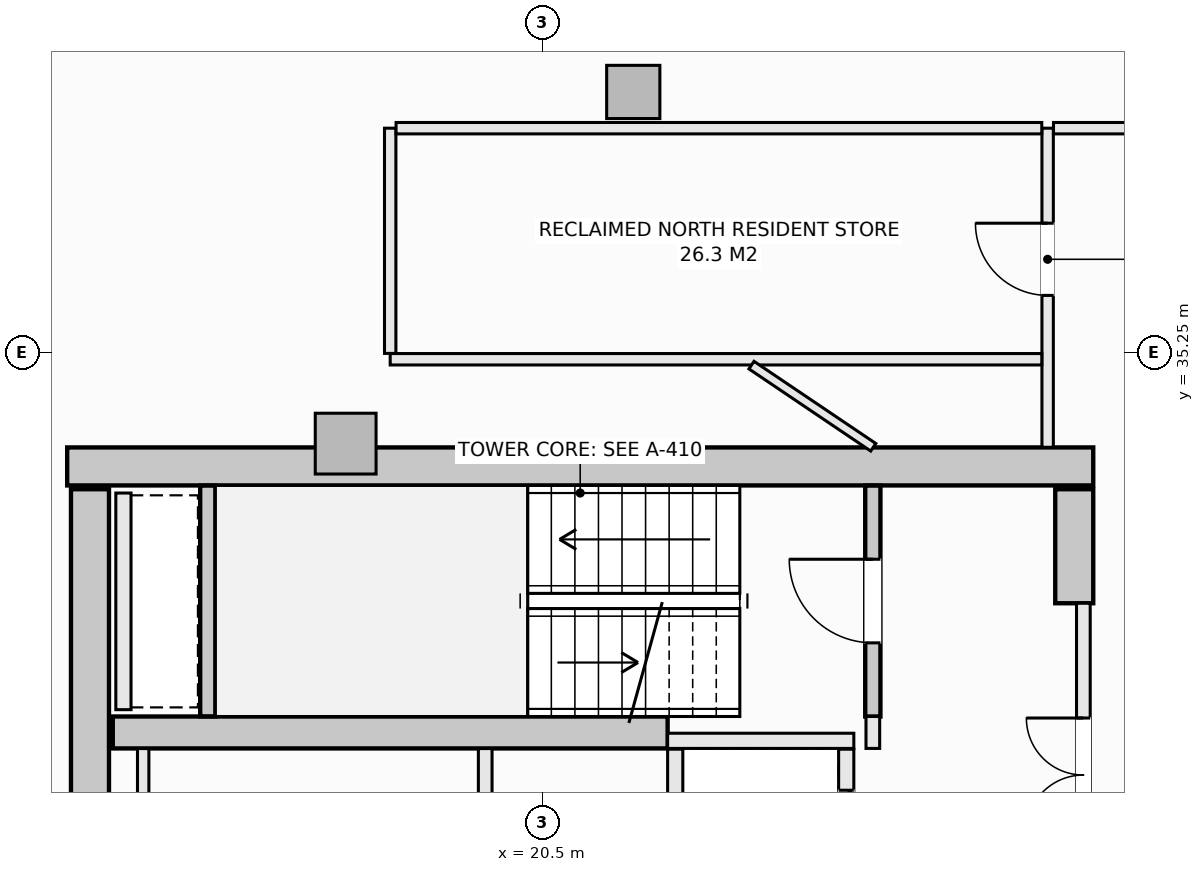
"""IFC4 building model, lengths in metres.
Left out: names, types, materials, properties, quantities, classifications, styles, units other than length and angle.
Written with IfcOpenShell. Run it as: python <this file> out.ifc"""

import sys

from ifc_helpers import new_model, si_unit, direction, frame, frame_2d, origin, origin_2d, place, context, subcontext, project, spatial, rectangle, extrude, element, fill, save


model = new_model("IFC4")
c1 = context("Model", 3, precision=1e-05, world=origin(), true_north=direction((0.0, 1.0)))
c2 = subcontext(c1, "Body", "Model", "MODEL_VIEW")
j1 = project(units=[si_unit("LENGTHUNIT", "METRE"), si_unit("PLANEANGLEUNIT", "RADIAN")], contexts=[c1])
p1 = place(None, origin())
s1 = spatial("IfcSite", under=j1, at=p1, CompositionType="ELEMENT")
p2 = place(p1, origin())
s2 = spatial("IfcBuilding", under=s1, at=p2, CompositionType="ELEMENT")
p3 = place(p2, frame((0.0, 0.0, 199.7)))
s3 = spatial("IfcBuildingStorey", under=s2, at=p3, CompositionType="ELEMENT", Elevation=199.7)
p4 = place(p3, frame((14.25, 33.75, -0.27), z_axis=(0.0, 0.0, 1.0), x_axis=(1.0, 0.0, 0.0)))
e1 = element("IfcWall", 1, at=p4, inside=s3, PredefinedType="SHEAR", context=c2, shape_type="SweptSolid", body=[
    extrude(rectangle(XDim=13.5, YDim=0.5, at=frame_2d((6.75, 0.0))), origin(), (0.0, 0.0, 1.0), 3.3),
])
p5 = place(p3, frame((14.55, 20.55, -0.27), z_axis=(0.0, 0.0, 1.0), x_axis=(0.0, 1.0, 0.0)))
e2 = element("IfcWall", 2, at=p5, inside=s3, PredefinedType="SHEAR", context=c2, shape_type="SweptSolid", body=[
    extrude(rectangle(XDim=12.9, YDim=0.5, at=frame_2d((6.45, 0.0))), origin(), (0.0, 0.0, 1.0), 3.3),
])
p6 = place(p3, frame((27.5, 31.95, -0.27), z_axis=(0.0, 0.0, 1.0), x_axis=(0.0, 1.0, 0.0)))
e3 = element("IfcWall", 3, at=p6, inside=s3, PredefinedType="SHEAR", context=c2, shape_type="SweptSolid", body=[
    extrude(rectangle(XDim=1.5, YDim=0.5, at=frame_2d((0.75, 0.0))), origin(), (0.0, 0.0, 1.0), 3.3),
])
p7 = place(p3, frame((14.85, 30.25, -0.27), z_axis=(0.0, 0.0, 1.0), x_axis=(1.0, 0.0, 0.0)))
e4 = element("IfcWall", 4, at=p7, inside=s3, PredefinedType="SHEAR", context=c2, shape_type="SweptSolid", body=[
    extrude(rectangle(XDim=7.3, YDim=0.42, at=frame_2d((3.65, 0.0))), origin(), (0.0, 0.0, 1.0), 3.3),
])
p8 = place(p3, frame((21.698, 38.677, -0.27), z_axis=(0.0, 0.0, 1.0), x_axis=(1.0, 0.0, 0.0)))
e5 = element("IfcColumn", 5, at=p8, inside=s3, PredefinedType="COLUMN", context=c2, shape_type="SweptSolid", body=[
    extrude(rectangle(XDim=0.7, YDim=0.7, at=origin_2d()), origin(), (0.0, 0.0, 1.0), 3.3),
])
p9 = place(p3, frame((17.914, 34.05, -0.27), z_axis=(0.0, 0.0, 1.0), x_axis=(1.0, 0.0, 0.0)))
e6 = element("IfcColumn", 6, at=p9, inside=s3, PredefinedType="PILASTER", context=c2, shape_type="SweptSolid", body=[
    extrude(rectangle(XDim=0.8, YDim=0.8, at=origin_2d()), origin(), (0.0, 0.0, 1.0), 3.3),
])
p10 = place(p3, frame((8.691, 36.9, 0.0), z_axis=(0.0, 0.0, 1.0), x_axis=(0.901348331142, 0.433094892545, 0.0)))
e7 = element("IfcWall", 7, at=p10, inside=s3, PredefinedType="SOLIDWALL", context=c2, shape_type="SweptSolid", body=[
    extrude(rectangle(XDim=6.021, YDim=0.3, at=frame_2d((3.01, 0.0))), origin(), (0.0, 0.0, 1.0), 2.605),
])
p11 = place(p10, frame((1.91, 0.0, 0.72)))
e8 = element("IfcOpeningElement", 8, at=p11, cuts=e7, PredefinedType="OPENING", context=c2, shape_type="SweptSolid", body=[
    extrude(rectangle(XDim=2.2, YDim=1.65, at=frame_2d((1.1, 0.825))), frame((0.0, 0.16, 0.0), z_axis=(0.0, -1.0, 0.0), x_axis=(1.0, 0.0, 0.0)), (0.0, 0.0, 1.0), 0.32),
])
p12 = place(p3, frame((24.85, 30.46, -0.27), z_axis=(0.0, 0.0, 1.0), x_axis=(0.0, 1.0, 0.0)))
e9 = element("IfcWall", 9, at=p12, inside=s3, PredefinedType="SHEAR", context=c2, shape_type="SweptSolid", body=[
    extrude(rectangle(XDim=3.038, YDim=0.2, at=frame_2d((1.519, 0.0))), origin(), (0.0, 0.0, 1.0), 3.3),
])
p13 = place(p12, frame((0.969, 0.0, 0.27)))
e10 = element("IfcOpeningElement", 10, at=p13, cuts=e9, PredefinedType="OPENING", context=c2, shape_type="SweptSolid", body=[
    extrude(rectangle(XDim=1.1, YDim=2.15, at=frame_2d((0.55, 1.075))), frame((0.0, 0.11, 0.0), z_axis=(0.0, -1.0, 0.0), x_axis=(1.0, 0.0, 0.0)), (0.0, 0.0, 1.0), 0.22),
])
p14 = place(p3, frame((16.1, 30.462, -0.27), z_axis=(0.0, 0.0, 1.0), x_axis=(0.0, 1.0, 0.0)))
e11 = element("IfcWall", 11, at=p14, inside=s3, PredefinedType="SHEAR", context=c2, shape_type="SweptSolid", body=[
    extrude(rectangle(XDim=3.036, YDim=0.2, at=frame_2d((1.518, 0.0))), origin(), (0.0, 0.0, 1.0), 3.3),
])
p15 = place(p3, frame((22.15, 30.14, 0.0), z_axis=(0.0, 0.0, 1.0), x_axis=(1.0, 0.0, 0.0)))
e12 = element("IfcWall", 12, at=p15, inside=s3, PredefinedType="SOLIDWALL", context=c2, shape_type="SweptSolid", body=[
    extrude(rectangle(XDim=2.45, YDim=0.2, at=frame_2d((1.225, 0.0))), origin(), (0.0, 0.0, 1.0), 3.03),
])
p16 = place(p3, frame((22.25, 27.85, 0.0), z_axis=(0.0, 0.0, 1.0), x_axis=(0.0, 1.0, 0.0)))
e13 = element("IfcWall", 13, at=p16, inside=s3, PredefinedType="SOLIDWALL", context=c2, shape_type="SweptSolid", body=[
    extrude(rectangle(XDim=2.18, YDim=0.2, at=frame_2d((1.09, 0.0))), origin(), (0.0, 0.0, 1.0), 3.03),
])
p17 = place(p3, frame((24.5, 27.85, 0.0), z_axis=(0.0, 0.0, 1.0), x_axis=(0.0, 1.0, 0.0)))
e14 = element("IfcWall", 14, at=p17, inside=s3, PredefinedType="SOLIDWALL", context=c2, shape_type="SweptSolid", body=[
    extrude(rectangle(XDim=2.18, YDim=0.2, at=frame_2d((1.09, 0.0))), origin(), (0.0, 0.0, 1.0), 3.03),
])
p18 = place(p17, frame((0.54, 0.0, 0.0)))
e15 = element("IfcOpeningElement", 15, at=p18, cuts=e14, PredefinedType="OPENING", context=c2, shape_type="SweptSolid", body=[
    extrude(rectangle(XDim=1.1, YDim=2.2, at=frame_2d((0.55, 1.1))), frame((0.0, 0.11, 0.0), z_axis=(0.0, -1.0, 0.0), x_axis=(1.0, 0.0, 0.0)), (0.0, 0.0, 1.0), 0.22),
])
p19 = place(p3, frame((14.99, 30.55, 0.0), z_axis=(0.0, 0.0, 1.0), x_axis=(0.0, 1.0, 0.0)))
e16 = element("IfcWall", 16, at=p19, inside=s3, PredefinedType="SOLIDWALL", context=c2, shape_type="SweptSolid", body=[
    extrude(rectangle(XDim=2.85, YDim=0.2, at=frame_2d((1.425, 0.0))), origin(), (0.0, 0.0, 1.0), 3.03),
])
p20 = place(p3, frame((24.85, 30.04, 0.0), z_axis=(0.0, 0.0, 1.0), x_axis=(0.0, 1.0, 0.0)))
e17 = element("IfcWall", 17, at=p20, inside=s3, PredefinedType="SOLIDWALL", context=c2, shape_type="SweptSolid", body=[
    extrude(rectangle(XDim=0.42, YDim=0.18, at=frame_2d((0.21, 0.0))), origin(), (0.0, 0.0, 1.0), 3.03),
])
p21 = place(p3, frame((27.62, 22.05, 0.0), z_axis=(0.0, 0.0, 1.0), x_axis=(0.0, 1.0, 0.0)))
e18 = element("IfcWall", 18, at=p21, inside=s3, PredefinedType="SOLIDWALL", context=c2, shape_type="SweptSolid", body=[
    extrude(rectangle(XDim=9.9, YDim=0.18, at=frame_2d((4.95, 0.0))), origin(), (0.0, 0.0, 1.0), 3.03),
])
p22 = place(p21, frame((4.475, 0.0, 0.0)))
e19 = element("IfcOpeningElement", 19, at=p22, cuts=e18, PredefinedType="OPENING", context=c2, shape_type="SweptSolid", body=[
    extrude(rectangle(XDim=0.95, YDim=2.1, at=frame_2d((0.475, 1.05))), frame((0.0, 0.1, 0.0), z_axis=(0.0, -1.0, 0.0), x_axis=(1.0, 0.0, 0.0)), (0.0, 0.0, 1.0), 0.2),
])
p23 = place(p21, frame((6.89, 0.0, 0.0)))
e20 = element("IfcOpeningElement", 20, at=p23, cuts=e18, PredefinedType="OPENING", context=c2, shape_type="SweptSolid", body=[
    extrude(rectangle(XDim=1.5, YDim=2.2, at=frame_2d((0.75, 1.1))), frame((0.0, 0.1, 0.0), z_axis=(0.0, -1.0, 0.0), x_axis=(1.0, 0.0, 0.0)), (0.0, 0.0, 1.0), 0.2),
])
p24 = place(p21, frame((1.51, 0.0, 0.0)))
e21 = element("IfcOpeningElement", 21, at=p24, cuts=e18, PredefinedType="OPENING", context=c2, shape_type="SweptSolid", body=[
    extrude(rectangle(XDim=1.5, YDim=2.2, at=frame_2d((0.75, 1.1))), frame((0.0, 0.1, 0.0), z_axis=(0.0, -1.0, 0.0), x_axis=(1.0, 0.0, 0.0)), (0.0, 0.0, 1.0), 0.2),
])
p25 = place(p3, frame((15.25, 27.932, 0.0), z_axis=(0.0, 0.0, 1.0), x_axis=(0.0, 1.0, 0.0)))
e22 = element("IfcWall", 22, at=p25, inside=s3, PredefinedType="PARTITIONING", context=c2, shape_type="SweptSolid", body=[
    extrude(rectangle(XDim=2.106, YDim=0.15, at=frame_2d((1.053, 0.0))), origin(), (0.0, 0.0, 1.0), 3.03),
])
p26 = place(p3, frame((19.75, 27.932, 0.0), z_axis=(0.0, 0.0, 1.0), x_axis=(0.0, 1.0, 0.0)))
e23 = element("IfcWall", 23, at=p26, inside=s3, PredefinedType="SOLIDWALL", context=c2, shape_type="SweptSolid", body=[
    extrude(rectangle(XDim=2.106, YDim=0.18, at=frame_2d((1.053, 0.0))), origin(), (0.0, 0.0, 1.0), 3.03),
])
p27 = place(p3, frame((27.15, 34.002, 0.0), z_axis=(0.0, 0.0, 1.0), x_axis=(0.0, 1.0, 0.0)))
e24 = element("IfcWall", 24, at=p27, inside=s3, PredefinedType="PARTITIONING", context=c2, shape_type="SweptSolid", body=[
    extrude(rectangle(XDim=4.198, YDim=0.15, at=frame_2d((2.099, 0.0))), origin(), (0.0, 0.0, 1.0), 3.03),
])
p28 = place(p27, frame((1.998, 0.0, 0.0)))
e25 = element("IfcOpeningElement", 25, at=p28, cuts=e24, PredefinedType="OPENING", context=c2, shape_type="SweptSolid", body=[
    extrude(rectangle(XDim=0.95, YDim=2.1, at=frame_2d((0.475, 1.05))), frame((0.0, 0.085, 0.0), z_axis=(0.0, -1.0, 0.0), x_axis=(1.0, 0.0, 0.0)), (0.0, 0.0, 1.0), 0.17),
])
p29 = place(p3, frame((18.5, 35.16, 0.0), z_axis=(0.0, 0.0, 1.0), x_axis=(1.0, 0.0, 0.0)))
e26 = element("IfcWall", 26, at=p29, inside=s3, PredefinedType="PARTITIONING", context=c2, shape_type="SweptSolid", body=[
    extrude(rectangle(XDim=8.573, YDim=0.15, at=frame_2d((4.287, 0.0))), origin(), (0.0, 0.0, 1.0), 3.03),
])
p30 = place(p3, frame((18.5, 35.237, 0.0), z_axis=(0.0, 0.0, 1.0), x_axis=(0.0, 1.0, 0.0)))
e27 = element("IfcWall", 27, at=p30, inside=s3, PredefinedType="PARTITIONING", context=c2, shape_type="SweptSolid", body=[
    extrude(rectangle(XDim=2.963, YDim=0.15, at=frame_2d((1.481, 0.0))), origin(), (0.0, 0.0, 1.0), 3.03),
])
p31 = place(p3, frame((18.577, 38.2, 0.0), z_axis=(0.0, 0.0, 1.0), x_axis=(1.0, 0.0, 0.0)))
e28 = element("IfcWall", 28, at=p31, inside=s3, PredefinedType="PARTITIONING", context=c2, shape_type="SweptSolid", body=[
    extrude(rectangle(XDim=8.496, YDim=0.15, at=frame_2d((4.248, 0.0))), origin(), (0.0, 0.0, 1.0), 3.03),
])
p32 = place(p3, frame((27.227, 38.2, 0.0), z_axis=(0.0, 0.0, 1.0), x_axis=(1.0, 0.0, 0.0)))
e29 = element("IfcWall", 29, at=p32, inside=s3, PredefinedType="PARTITIONING", context=c2, shape_type="SweptSolid", body=[
    extrude(rectangle(XDim=2.733, YDim=0.15, at=frame_2d((1.366, 0.0))), origin(), (0.0, 0.0, 1.0), 3.03),
])
p33 = place(p3, frame((23.253, 35.083, 0.0), z_axis=(0.0, 0.0, 1.0), x_axis=(0.8290462611, -0.559180021957, 0.0)))
e30 = element("IfcWall", 30, at=p33, inside=s3, PredefinedType="PARTITIONING", context=c2, shape_type="SweptSolid", body=[
    extrude(rectangle(XDim=1.933, YDim=0.12, at=frame_2d((0.967, 0.0))), origin(), (0.0, 0.0, 1.0), 3.03),
])
p34 = place(p13, origin())
e31 = element("IfcDoor", 31, at=p34, inside=s3, OperationType="SINGLE_SWING_RIGHT", PredefinedType="DOOR", context=c2, shape_type="SweptSolid", body=[
    extrude(rectangle(XDim=1.1, YDim=2.15, at=frame_2d((0.55, 1.075))), frame((0.0, 0.025, 0.0), z_axis=(0.0, -1.0, 0.0), x_axis=(1.0, 0.0, 0.0)), (0.0, 0.0, 1.0), 0.05),
])
fill(e10, e31)
p35 = place(p18, origin())
e32 = element("IfcDoor", 32, at=p35, inside=s3, OperationType="SLIDING_TO_LEFT", PredefinedType="DOOR", context=c2, shape_type="SweptSolid", body=[
    extrude(rectangle(XDim=1.1, YDim=2.2, at=frame_2d((0.55, 1.1))), frame((0.0, 0.025, 0.0), z_axis=(0.0, -1.0, 0.0), x_axis=(1.0, 0.0, 0.0)), (0.0, 0.0, 1.0), 0.05),
])
fill(e15, e32)
p36 = place(p23, origin())
e33 = element("IfcDoor", 33, at=p36, inside=s3, OperationType="DOUBLE_DOOR_SINGLE_SWING", PredefinedType="DOOR", context=c2, shape_type="SweptSolid", body=[
    extrude(rectangle(XDim=1.5, YDim=2.2, at=frame_2d((0.75, 1.1))), frame((0.0, 0.025, 0.0), z_axis=(0.0, -1.0, 0.0), x_axis=(1.0, 0.0, 0.0)), (0.0, 0.0, 1.0), 0.05),
])
fill(e20, e33)
p37 = place(p28, origin())
e34 = element("IfcDoor", 34, at=p37, inside=s3, OperationType="SINGLE_SWING_RIGHT", PredefinedType="DOOR", context=c2, shape_type="SweptSolid", body=[
    extrude(rectangle(XDim=0.95, YDim=2.1, at=frame_2d((0.475, 1.05))), frame((0.0, 0.025, 0.0), z_axis=(0.0, -1.0, 0.0), x_axis=(1.0, 0.0, 0.0)), (0.0, 0.0, 1.0), 0.05),
])
fill(e25, e34)
save(model, sys.argv[1])
